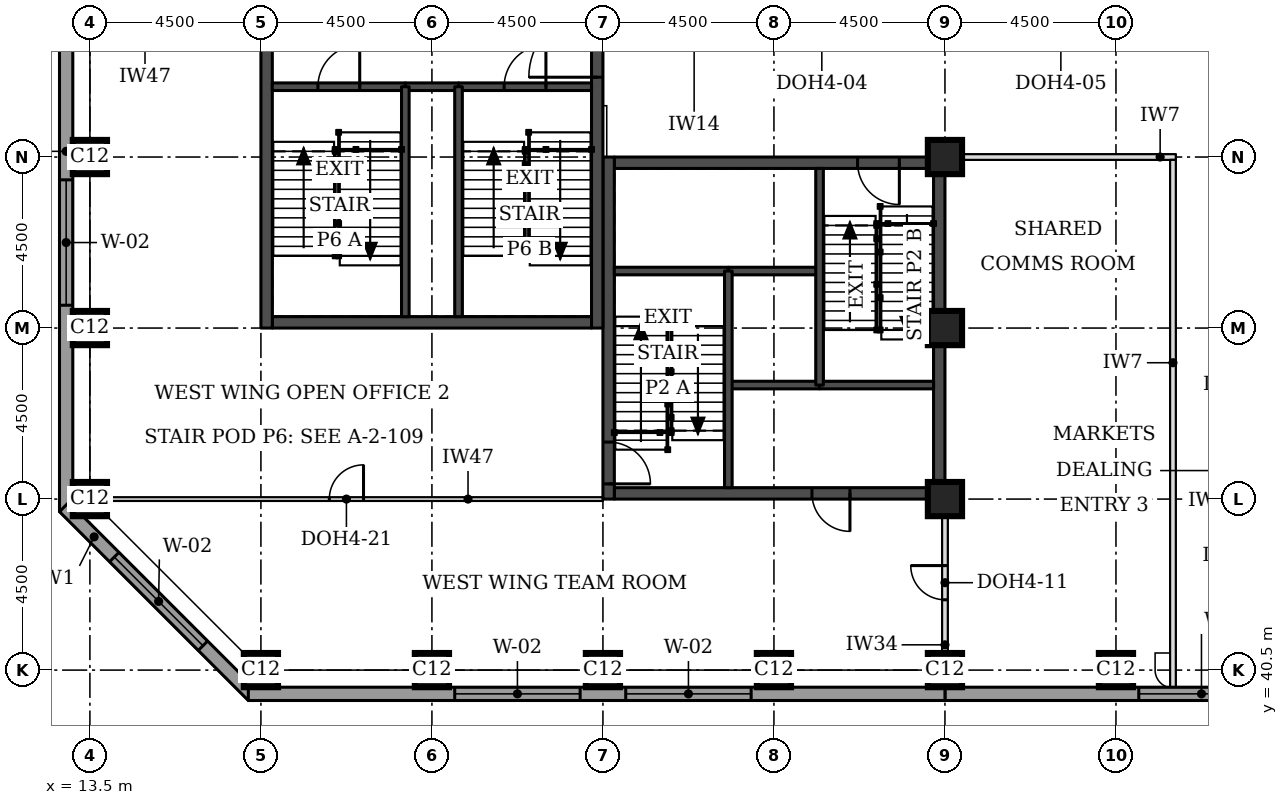
"""IFC4 building model, lengths in metres.
Left out: names, types, materials, properties, quantities, classifications, styles, units other than length and angle.
Written with IfcOpenShell. Run it as: python <this file> out.ifc"""

import sys

from ifc_helpers import new_model, si_unit, direction, frame, frame_2d, origin, origin_2d, place, context, subcontext, project, spatial, rectangle, extrude, element, fill, save


model = new_model("IFC4")
c1 = context("Model", 3, precision=1e-05, world=origin(), true_north=direction((0.0, 1.0)))
c2 = subcontext(c1, "Body", "Model", "MODEL_VIEW")
j1 = project(units=[si_unit("LENGTHUNIT", "METRE"), si_unit("PLANEANGLEUNIT", "RADIAN")], contexts=[c1])
p1 = place(None, origin())
s1 = spatial("IfcSite", under=j1, at=p1, CompositionType="ELEMENT")
p2 = place(p1, origin())
s2 = spatial("IfcBuilding", under=s1, at=p2, CompositionType="ELEMENT")
p3 = place(p2, frame((0.0, 0.0, 173.6)))
s3 = spatial("IfcBuildingStorey", under=s2, at=p3, CompositionType="ELEMENT", Elevation=173.6)
for number, where, z_axis, x_axis in (
    (1, (18.0, 40.5, 0.0), (0.0, 0.0, 1.0), (1.0, 0.0, 0.0)),
    (2, (22.5, 40.5, 0.0), (0.0, 0.0, 1.0), (1.0, 0.0, 0.0)),
    (3, (27.0, 40.5, 0.0), (0.0, 0.0, 1.0), (1.0, 0.0, 0.0)),
    (4, (31.5, 40.5, 0.0), (0.0, 0.0, 1.0), (1.0, 0.0, 0.0)),
    (5, (36.0, 40.5, 0.0), (0.0, 0.0, 1.0), (1.0, 0.0, 0.0)),
    (6, (40.5, 40.5, 0.0), (0.0, 0.0, 1.0), (1.0, 0.0, 0.0)),
    (7, (13.5, 45.0, 0.0), (0.0, 0.0, 1.0), (1.0, 0.0, 0.0)),
    (8, (36.0, 45.0, 0.0), (0.0, 0.0, 1.0), (1.0, 0.0, 0.0)),
    (9, (13.5, 49.5, 0.0), (0.0, 0.0, 1.0), (1.0, 0.0, 0.0)),
    (10, (36.0, 49.5, 0.0), (0.0, 0.0, 1.0), (1.0, 0.0, 0.0)),
    (11, (13.5, 54.0, 0.0), (0.0, 0.0, 1.0), (1.0, 0.0, 0.0)),
    (12, (36.0, 54.0, 0.0), (0.0, 0.0, 1.0), (1.0, 0.0, 0.0)),
):
    element("IfcColumn", number, at=place(p3, frame(where, z_axis=z_axis, x_axis=x_axis)), inside=s3, PredefinedType="COLUMN", context=c2, shape_type="SweptSolid", body=[
        extrude(rectangle(XDim=0.9, YDim=0.9, at=origin_2d()), origin(), (0.0, 0.0, 1.0), 3.7),
    ])
p4 = place(p3, frame((27.3, 45.15, 0.0), z_axis=(0.0, 0.0, 1.0), x_axis=(1.0, 0.0, 0.0)))
e13 = element("IfcWall", 13, at=p4, inside=s3, PredefinedType="SHEAR", context=c2, shape_type="SweptSolid", body=[
    extrude(rectangle(XDim=8.4, YDim=0.3, at=frame_2d((4.2, 0.0))), origin(), (0.0, 0.0, 1.0), 3.7),
])
p5 = place(p4, frame((5.2, 0.0, 0.0)))
e14 = element("IfcOpeningElement", 14, at=p5, cuts=e13, PredefinedType="OPENING", context=c2, shape_type="SweptSolid", body=[
    extrude(rectangle(XDim=1.0, YDim=2.1, at=frame_2d((0.5, 1.05))), frame((0.0, 0.16, 0.0), z_axis=(0.0, -1.0, 0.0), x_axis=(1.0, 0.0, 0.0)), (0.0, 0.0, 1.0), 0.32),
])
p6 = place(p3, frame((27.3, 53.85, 0.0), z_axis=(0.0, 0.0, 1.0), x_axis=(1.0, 0.0, 0.0)))
e15 = element("IfcWall", 15, at=p6, inside=s3, PredefinedType="SHEAR", context=c2, shape_type="SweptSolid", body=[
    extrude(rectangle(XDim=8.4, YDim=0.3, at=frame_2d((4.2, 0.0))), origin(), (0.0, 0.0, 1.0), 3.7),
])
p7 = place(p6, frame((6.4, 0.0, 0.0)))
e16 = element("IfcOpeningElement", 16, at=p7, cuts=e15, PredefinedType="OPENING", context=c2, shape_type="SweptSolid", body=[
    extrude(rectangle(XDim=1.1, YDim=2.1, at=frame_2d((0.55, 1.05))), frame((0.0, 0.16, 0.0), z_axis=(0.0, -1.0, 0.0), x_axis=(1.0, 0.0, 0.0)), (0.0, 0.0, 1.0), 0.32),
])
p8 = place(p3, frame((27.15, 45.0, 0.0), z_axis=(0.0, 0.0, 1.0), x_axis=(0.0, 1.0, 0.0)))
e17 = element("IfcWall", 17, at=p8, inside=s3, PredefinedType="SHEAR", context=c2, shape_type="SweptSolid", body=[
    extrude(rectangle(XDim=9.0, YDim=0.3, at=frame_2d((4.5, 0.0))), origin(), (0.0, 0.0, 1.0), 3.7),
])
p9 = place(p8, frame((0.4, 0.0, 0.0)))
e18 = element("IfcOpeningElement", 18, at=p9, cuts=e17, PredefinedType="OPENING", context=c2, shape_type="SweptSolid", body=[
    extrude(rectangle(XDim=1.1, YDim=2.1, at=frame_2d((0.55, 1.05))), frame((0.0, 0.16, 0.0), z_axis=(0.0, -1.0, 0.0), x_axis=(1.0, 0.0, 0.0)), (0.0, 0.0, 1.0), 0.32),
])
p10 = place(p3, frame((35.85, 45.0, 0.0), z_axis=(0.0, 0.0, 1.0), x_axis=(0.0, 1.0, 0.0)))
e19 = element("IfcWall", 19, at=p10, inside=s3, PredefinedType="SHEAR", context=c2, shape_type="SweptSolid", body=[
    extrude(rectangle(XDim=9.0, YDim=0.3, at=frame_2d((4.5, 0.0))), origin(), (0.0, 0.0, 1.0), 3.7),
])
p11 = place(p3, frame((18.3, 49.65, 0.0), z_axis=(0.0, 0.0, 1.0), x_axis=(1.0, 0.0, 0.0)))
e20 = element("IfcWall", 20, at=p11, inside=s3, PredefinedType="SHEAR", context=c2, shape_type="SweptSolid", body=[
    extrude(rectangle(XDim=8.4, YDim=0.3, at=frame_2d((4.2, 0.0))), origin(), (0.0, 0.0, 1.0), 3.7),
])
p12 = place(p3, frame((18.15, 49.5, 0.0), z_axis=(0.0, 0.0, 1.0), x_axis=(0.0, 1.0, 0.0)))
e21 = element("IfcWall", 21, at=p12, inside=s3, PredefinedType="SHEAR", context=c2, shape_type="SweptSolid", body=[
    extrude(rectangle(XDim=9.0, YDim=0.3, at=frame_2d((4.5, 0.0))), origin(), (0.0, 0.0, 1.0), 3.7),
])
p13 = place(p3, frame((26.85, 49.5, 0.0), z_axis=(0.0, 0.0, 1.0), x_axis=(0.0, 1.0, 0.0)))
e22 = element("IfcWall", 22, at=p13, inside=s3, PredefinedType="SHEAR", context=c2, shape_type="SweptSolid", body=[
    extrude(rectangle(XDim=9.0, YDim=0.3, at=frame_2d((4.5, 0.0))), origin(), (0.0, 0.0, 1.0), 3.7),
])
p14 = place(p13, frame((6.6, 0.0, 0.0)))
e23 = element("IfcOpeningElement", 23, at=p14, cuts=e22, PredefinedType="OPENING", context=c2, shape_type="SweptSolid", body=[
    extrude(rectangle(XDim=1.8, YDim=2.1, at=frame_2d((0.9, 1.05))), frame((0.0, 0.16, 0.0), z_axis=(0.0, -1.0, 0.0), x_axis=(1.0, 0.0, 0.0)), (0.0, 0.0, 1.0), 0.32),
])
p15 = place(p3, frame((36.0, 39.875, 0.0), z_axis=(0.0, 0.0, 1.0), x_axis=(1.0, 0.0, 0.0)))
e24 = element("IfcWall", 24, at=p15, inside=s3, PredefinedType="STANDARD", context=c2, shape_type="SweptSolid", body=[
    extrude(rectangle(XDim=36.331, YDim=0.35, at=frame_2d((18.166, 0.0))), origin(), (0.0, 0.0, 1.0), 3.525),
])
p16 = place(p15, frame((5.1, 0.0, 0.9)))
e25 = element("IfcOpeningElement", 25, at=p16, cuts=e24, PredefinedType="OPENING", context=c2, shape_type="SweptSolid", body=[
    extrude(rectangle(XDim=3.3, YDim=1.9, at=frame_2d((1.65, 0.95))), frame((0.0, 0.185, 0.0), z_axis=(0.0, -1.0, 0.0), x_axis=(1.0, 0.0, 0.0)), (0.0, 0.0, 1.0), 0.37),
])
p17 = place(p15, frame((9.6, 0.0, 0.9)))
e26 = element("IfcOpeningElement", 26, at=p17, cuts=e24, PredefinedType="OPENING", context=c2, shape_type="SweptSolid", body=[
    extrude(rectangle(XDim=3.3, YDim=1.9, at=frame_2d((1.65, 0.95))), frame((0.0, 0.185, 0.0), z_axis=(0.0, -1.0, 0.0), x_axis=(1.0, 0.0, 0.0)), (0.0, 0.0, 1.0), 0.37),
])
p18 = place(p15, frame((14.1, 0.0, 0.9)))
e27 = element("IfcOpeningElement", 27, at=p18, cuts=e24, PredefinedType="OPENING", context=c2, shape_type="SweptSolid", body=[
    extrude(rectangle(XDim=3.3, YDim=1.9, at=frame_2d((1.65, 0.95))), frame((0.0, 0.185, 0.0), z_axis=(0.0, -1.0, 0.0), x_axis=(1.0, 0.0, 0.0)), (0.0, 0.0, 1.0), 0.37),
])
p19 = place(p15, frame((18.6, 0.0, 0.9)))
e28 = element("IfcOpeningElement", 28, at=p19, cuts=e24, PredefinedType="OPENING", context=c2, shape_type="SweptSolid", body=[
    extrude(rectangle(XDim=3.3, YDim=1.9, at=frame_2d((1.65, 0.95))), frame((0.0, 0.185, 0.0), z_axis=(0.0, -1.0, 0.0), x_axis=(1.0, 0.0, 0.0)), (0.0, 0.0, 1.0), 0.37),
])
p20 = place(p15, frame((23.1, 0.0, 0.9)))
e29 = element("IfcOpeningElement", 29, at=p20, cuts=e24, PredefinedType="OPENING", context=c2, shape_type="SweptSolid", body=[
    extrude(rectangle(XDim=3.3, YDim=1.9, at=frame_2d((1.65, 0.95))), frame((0.0, 0.185, 0.0), z_axis=(0.0, -1.0, 0.0), x_axis=(1.0, 0.0, 0.0)), (0.0, 0.0, 1.0), 0.37),
])
p21 = place(p15, frame((27.6, 0.0, 0.9)))
e30 = element("IfcOpeningElement", 30, at=p21, cuts=e24, PredefinedType="OPENING", context=c2, shape_type="SweptSolid", body=[
    extrude(rectangle(XDim=3.3, YDim=1.9, at=frame_2d((1.65, 0.95))), frame((0.0, 0.185, 0.0), z_axis=(0.0, -1.0, 0.0), x_axis=(1.0, 0.0, 0.0)), (0.0, 0.0, 1.0), 0.37),
])
p22 = place(p3, frame((12.875, 58.831, 0.0), z_axis=(0.0, 0.0, 1.0), x_axis=(0.0, -1.0, 0.0)))
e31 = element("IfcWall", 31, at=p22, inside=s3, PredefinedType="STANDARD", context=c2, shape_type="SweptSolid", body=[
    extrude(rectangle(XDim=14.163, YDim=0.35, at=frame_2d((7.081, 0.0))), origin(), (0.0, 0.0, 1.0), 3.525),
])
p23 = place(p22, frame((5.431, 0.0, 0.9)))
e32 = element("IfcOpeningElement", 32, at=p23, cuts=e31, PredefinedType="OPENING", context=c2, shape_type="SweptSolid", body=[
    extrude(rectangle(XDim=3.3, YDim=1.9, at=frame_2d((1.65, 0.95))), frame((0.0, 0.185, 0.0), z_axis=(0.0, -1.0, 0.0), x_axis=(1.0, 0.0, 0.0)), (0.0, 0.0, 1.0), 0.37),
])
p24 = place(p3, frame((12.824, 44.792, 0.0), z_axis=(0.0, 0.0, 1.0), x_axis=(0.707106781187, -0.707106781187, 0.0)))
e33 = element("IfcWall", 33, at=p24, inside=s3, PredefinedType="STANDARD", context=c2, shape_type="SweptSolid", body=[
    extrude(rectangle(XDim=7.027, YDim=0.35, at=frame_2d((3.513, 0.0))), origin(), (0.0, 0.0, 1.0), 3.525),
])
p25 = place(p24, frame((1.863, 0.0, 0.9)))
e34 = element("IfcOpeningElement", 34, at=p25, cuts=e33, PredefinedType="OPENING", context=c2, shape_type="SweptSolid", body=[
    extrude(rectangle(XDim=3.3, YDim=1.9, at=frame_2d((1.65, 0.95))), frame((0.0, 0.185, 0.0), z_axis=(0.0, -1.0, 0.0), x_axis=(1.0, 0.0, 0.0)), (0.0, 0.0, 1.0), 0.37),
])
p26 = place(p3, frame((17.669, 39.875, 0.0), z_axis=(0.0, 0.0, 1.0), x_axis=(1.0, 0.0, 0.0)))
e35 = element("IfcWall", 35, at=p26, inside=s3, PredefinedType="STANDARD", context=c2, shape_type="SweptSolid", body=[
    extrude(rectangle(XDim=18.331, YDim=0.35, at=frame_2d((9.166, 0.0))), origin(), (0.0, 0.0, 1.0), 3.525),
])
p27 = place(p26, frame((5.431, 0.0, 0.9)))
e36 = element("IfcOpeningElement", 36, at=p27, cuts=e35, PredefinedType="OPENING", context=c2, shape_type="SweptSolid", body=[
    extrude(rectangle(XDim=3.3, YDim=1.9, at=frame_2d((1.65, 0.95))), frame((0.0, 0.185, 0.0), z_axis=(0.0, -1.0, 0.0), x_axis=(1.0, 0.0, 0.0)), (0.0, 0.0, 1.0), 0.37),
])
p28 = place(p26, frame((9.931, 0.0, 0.9)))
e37 = element("IfcOpeningElement", 37, at=p28, cuts=e35, PredefinedType="OPENING", context=c2, shape_type="SweptSolid", body=[
    extrude(rectangle(XDim=3.3, YDim=1.9, at=frame_2d((1.65, 0.95))), frame((0.0, 0.185, 0.0), z_axis=(0.0, -1.0, 0.0), x_axis=(1.0, 0.0, 0.0)), (0.0, 0.0, 1.0), 0.37),
])
p29 = place(p3, frame((36.45, 54.0, 0.0), z_axis=(0.0, 0.0, 1.0), x_axis=(1.0, 0.0, 0.0)))
e38 = element("IfcWall", 38, at=p29, inside=s3, PredefinedType="PARTITIONING", context=c2, shape_type="SweptSolid", body=[
    extrude(rectangle(XDim=5.625, YDim=0.15, at=frame_2d((2.812, 0.0))), origin(), (0.0, 0.0, 1.0), 3.55),
])
p30 = place(p3, frame((42.0, 40.05, 0.0), z_axis=(0.0, 0.0, 1.0), x_axis=(0.0, 1.0, 0.0)))
e39 = element("IfcWall", 39, at=p30, inside=s3, PredefinedType="PARTITIONING", context=c2, shape_type="SweptSolid", body=[
    extrude(rectangle(XDim=13.875, YDim=0.15, at=frame_2d((6.938, 0.0))), origin(), (0.0, 0.0, 1.0), 3.55),
])
p31 = place(p3, frame((36.0, 40.95, 0.0), z_axis=(0.0, 0.0, 1.0), x_axis=(0.0, 1.0, 0.0)))
e40 = element("IfcWall", 40, at=p31, inside=s3, PredefinedType="PARTITIONING", context=c2, shape_type="SweptSolid", body=[
    extrude(rectangle(XDim=3.63, YDim=0.15, at=frame_2d((1.815, 0.0))), origin(), (0.0, 0.0, 1.0), 2.8),
])
p32 = place(p31, frame((1.4, 0.0, 0.0)))
e41 = element("IfcOpeningElement", 41, at=p32, cuts=e40, PredefinedType="OPENING", context=c2, shape_type="SweptSolid", body=[
    extrude(rectangle(XDim=0.9, YDim=2.1, at=frame_2d((0.45, 1.05))), frame((0.0, 0.085, 0.0), z_axis=(0.0, -1.0, 0.0), x_axis=(1.0, 0.0, 0.0)), (0.0, 0.0, 1.0), 0.17),
])
p33 = place(p3, frame((27.0, 45.0, 0.0), z_axis=(0.0, 0.0, 1.0), x_axis=(-1.0, 0.0, 0.0)))
e42 = element("IfcWall", 42, at=p33, inside=s3, PredefinedType="PARTITIONING", context=c2, shape_type="SweptSolid", body=[
    extrude(rectangle(XDim=13.5, YDim=0.1, at=frame_2d((6.75, 0.0))), origin(), (0.0, 0.0, 1.0), 2.55),
])
p34 = place(p33, frame((6.3, 0.0, 0.0)))
e43 = element("IfcOpeningElement", 43, at=p34, cuts=e42, PredefinedType="OPENING", context=c2, shape_type="SweptSolid", body=[
    extrude(rectangle(XDim=0.9, YDim=2.1, at=frame_2d((0.45, 1.05))), frame((0.0, 0.06, 0.0), z_axis=(0.0, -1.0, 0.0), x_axis=(1.0, 0.0, 0.0)), (0.0, 0.0, 1.0), 0.12),
])
p35 = place(p3, frame((30.3, 48.0, 0.0), z_axis=(0.0, 0.0, 1.0), x_axis=(1.0, 0.0, 0.0)))
e44 = element("IfcWall", 44, at=p35, inside=s3, PredefinedType="SOLIDWALL", context=c2, shape_type="SweptSolid", body=[
    extrude(rectangle(XDim=2.4, YDim=0.2, at=frame_2d((1.2, 0.0))), origin(), (0.0, 0.0, 1.0), 3.55),
])
p36 = place(p3, frame((32.7, 48.0, 0.0), z_axis=(0.0, 0.0, 1.0), x_axis=(1.0, 0.0, 0.0)))
e45 = element("IfcWall", 45, at=p36, inside=s3, PredefinedType="SOLIDWALL", context=c2, shape_type="SweptSolid", body=[
    extrude(rectangle(XDim=3.0, YDim=0.2, at=frame_2d((1.5, 0.0))), origin(), (0.0, 0.0, 1.0), 3.55),
])
p37 = place(p3, frame((30.3, 51.0, 0.0), z_axis=(0.0, 0.0, 1.0), x_axis=(1.0, 0.0, 0.0)))
e46 = element("IfcWall", 46, at=p37, inside=s3, PredefinedType="SOLIDWALL", context=c2, shape_type="SweptSolid", body=[
    extrude(rectangle(XDim=2.4, YDim=0.2, at=frame_2d((1.2, 0.0))), origin(), (0.0, 0.0, 1.0), 3.7),
])
p38 = place(p3, frame((27.3, 51.0, 0.0), z_axis=(0.0, 0.0, 1.0), x_axis=(1.0, 0.0, 0.0)))
e47 = element("IfcWall", 47, at=p38, inside=s3, PredefinedType="SOLIDWALL", context=c2, shape_type="SweptSolid", body=[
    extrude(rectangle(XDim=3.0, YDim=0.2, at=frame_2d((1.5, 0.0))), origin(), (0.0, 0.0, 1.0), 3.55),
])
for number, where, z_axis, x_axis in (
    (48, (30.3, 45.3, 0.0), (0.0, 0.0, 1.0), (0.0, 1.0, 0.0)),
    (49, (32.7, 48.0, 0.0), (0.0, 0.0, 1.0), (0.0, 1.0, 0.0)),
):
    element("IfcWall", number, at=place(p3, frame(where, z_axis=z_axis, x_axis=x_axis)), inside=s3, PredefinedType="SOLIDWALL", context=c2, shape_type="SweptSolid", body=[
        extrude(rectangle(XDim=5.7, YDim=0.2, at=frame_2d((2.85, 0.0))), origin(), (0.0, 0.0, 1.0), 3.55),
    ])
p39 = place(p3, frame((21.8, 55.85, 0.0), z_axis=(0.0, 0.0, 1.0), x_axis=(1.0, 0.0, 0.0)))
e50 = element("IfcWall", 50, at=p39, inside=s3, PredefinedType="SOLIDWALL", context=c2, shape_type="SweptSolid", body=[
    extrude(rectangle(XDim=1.4, YDim=0.2, at=frame_2d((0.7, 0.0))), origin(), (0.0, 0.0, 1.0), 3.55),
])
p40 = place(p3, frame((18.3, 55.85, 0.0), z_axis=(0.0, 0.0, 1.0), x_axis=(1.0, 0.0, 0.0)))
e51 = element("IfcWall", 51, at=p40, inside=s3, PredefinedType="SOLIDWALL", context=c2, shape_type="SweptSolid", body=[
    extrude(rectangle(XDim=3.5, YDim=0.2, at=frame_2d((1.75, 0.0))), origin(), (0.0, 0.0, 1.0), 3.55),
])
p41 = place(p40, frame((1.2, 0.0, 0.0)))
e52 = element("IfcOpeningElement", 52, at=p41, cuts=e51, PredefinedType="OPENING", context=c2, shape_type="SweptSolid", body=[
    extrude(rectangle(XDim=1.1, YDim=2.1, at=frame_2d((0.55, 1.05))), frame((0.0, 0.11, 0.0), z_axis=(0.0, -1.0, 0.0), x_axis=(1.0, 0.0, 0.0)), (0.0, 0.0, 1.0), 0.22),
])
p42 = place(p3, frame((23.2, 55.85, 0.0), z_axis=(0.0, 0.0, 1.0), x_axis=(1.0, 0.0, 0.0)))
e53 = element("IfcWall", 53, at=p42, inside=s3, PredefinedType="SOLIDWALL", context=c2, shape_type="SweptSolid", body=[
    extrude(rectangle(XDim=3.5, YDim=0.2, at=frame_2d((1.75, 0.0))), origin(), (0.0, 0.0, 1.0), 3.55),
])
p43 = place(p42, frame((1.2, 0.0, 0.0)))
e54 = element("IfcOpeningElement", 54, at=p43, cuts=e53, PredefinedType="OPENING", context=c2, shape_type="SweptSolid", body=[
    extrude(rectangle(XDim=1.1, YDim=2.1, at=frame_2d((0.55, 1.05))), frame((0.0, 0.11, 0.0), z_axis=(0.0, -1.0, 0.0), x_axis=(1.0, 0.0, 0.0)), (0.0, 0.0, 1.0), 0.22),
])
for number, where, z_axis, x_axis in (
    (55, (21.8, 49.8, 0.0), (0.0, 0.0, 1.0), (0.0, 1.0, 0.0)),
    (56, (23.2, 49.8, 0.0), (0.0, 0.0, 1.0), (0.0, 1.0, 0.0)),
):
    element("IfcWall", number, at=place(p3, frame(where, z_axis=z_axis, x_axis=x_axis)), inside=s3, PredefinedType="SOLIDWALL", context=c2, shape_type="SweptSolid", body=[
        extrude(rectangle(XDim=6.05, YDim=0.2, at=frame_2d((3.025, 0.0))), origin(), (0.0, 0.0, 1.0), 3.55),
    ])
p44 = place(p16, origin())
e57 = element("IfcWindow", 57, at=p44, inside=s3, PartitioningType="SINGLE_PANEL", PredefinedType="WINDOW", context=c2, shape_type="SweptSolid", body=[
    extrude(rectangle(XDim=3.3, YDim=1.9, at=frame_2d((1.65, 0.95))), frame((0.0, 0.085, 0.0), z_axis=(0.0, -1.0, 0.0), x_axis=(1.0, 0.0, 0.0)), (0.0, 0.0, 1.0), 0.06),
])
fill(e25, e57)
p45 = place(p23, origin())
e58 = element("IfcWindow", 58, at=p45, inside=s3, PartitioningType="SINGLE_PANEL", PredefinedType="WINDOW", context=c2, shape_type="SweptSolid", body=[
    extrude(rectangle(XDim=3.3, YDim=1.9, at=frame_2d((1.65, 0.95))), frame((0.0, 0.085, 0.0), z_axis=(0.0, -1.0, 0.0), x_axis=(1.0, 0.0, 0.0)), (0.0, 0.0, 1.0), 0.06),
])
fill(e32, e58)
p46 = place(p25, origin())
e59 = element("IfcWindow", 59, at=p46, inside=s3, PartitioningType="SINGLE_PANEL", PredefinedType="WINDOW", context=c2, shape_type="SweptSolid", body=[
    extrude(rectangle(XDim=3.3, YDim=1.9, at=frame_2d((1.65, 0.95))), frame((0.0, 0.085, 0.0), z_axis=(0.0, -1.0, 0.0), x_axis=(1.0, 0.0, 0.0)), (0.0, 0.0, 1.0), 0.06),
])
fill(e34, e59)
p47 = place(p27, origin())
e60 = element("IfcWindow", 60, at=p47, inside=s3, PartitioningType="SINGLE_PANEL", PredefinedType="WINDOW", context=c2, shape_type="SweptSolid", body=[
    extrude(rectangle(XDim=3.3, YDim=1.9, at=frame_2d((1.65, 0.95))), frame((0.0, 0.085, 0.0), z_axis=(0.0, -1.0, 0.0), x_axis=(1.0, 0.0, 0.0)), (0.0, 0.0, 1.0), 0.06),
])
fill(e36, e60)
p48 = place(p28, origin())
e61 = element("IfcWindow", 61, at=p48, inside=s3, PartitioningType="SINGLE_PANEL", PredefinedType="WINDOW", context=c2, shape_type="SweptSolid", body=[
    extrude(rectangle(XDim=3.3, YDim=1.9, at=frame_2d((1.65, 0.95))), frame((0.0, 0.085, 0.0), z_axis=(0.0, -1.0, 0.0), x_axis=(1.0, 0.0, 0.0)), (0.0, 0.0, 1.0), 0.06),
])
fill(e37, e61)
p49 = place(p32, origin())
e62 = element("IfcDoor", 62, at=p49, inside=s3, OperationType="SINGLE_SWING_RIGHT", PredefinedType="DOOR", context=c2, shape_type="SweptSolid", body=[
    extrude(rectangle(XDim=0.9, YDim=2.1, at=frame_2d((0.45, 1.05))), frame((0.0, 0.025, 0.0), z_axis=(0.0, -1.0, 0.0), x_axis=(1.0, 0.0, 0.0)), (0.0, 0.0, 1.0), 0.05),
])
fill(e41, e62)
p50 = place(p34, frame((0.9, 0.0, 0.0), z_axis=(0.0, 0.0, 1.0), x_axis=(-1.0, 0.0, 0.0)))
e63 = element("IfcDoor", 63, at=p50, inside=s3, OperationType="SINGLE_SWING_RIGHT", PredefinedType="DOOR", context=c2, shape_type="SweptSolid", body=[
    extrude(rectangle(XDim=0.9, YDim=2.1, at=frame_2d((0.45, 1.05))), frame((0.0, 0.025, 0.0), z_axis=(0.0, -1.0, 0.0), x_axis=(1.0, 0.0, 0.0)), (0.0, 0.0, 1.0), 0.05),
])
fill(e43, e63)
p51 = place(p9, frame((1.1, 0.0, 0.0), z_axis=(0.0, 0.0, 1.0), x_axis=(-1.0, 0.0, 0.0)))
e64 = element("IfcDoor", 64, at=p51, inside=s3, OperationType="SINGLE_SWING_RIGHT", PredefinedType="DOOR", context=c2, shape_type="SweptSolid", body=[
    extrude(rectangle(XDim=1.1, YDim=2.1, at=frame_2d((0.55, 1.05))), frame((0.0, 0.025, 0.0), z_axis=(0.0, -1.0, 0.0), x_axis=(1.0, 0.0, 0.0)), (0.0, 0.0, 1.0), 0.05),
])
fill(e18, e64)
p52 = place(p7, frame((1.1, 0.0, 0.0), z_axis=(0.0, 0.0, 1.0), x_axis=(-1.0, 0.0, 0.0)))
e65 = element("IfcDoor", 65, at=p52, inside=s3, OperationType="SINGLE_SWING_LEFT", PredefinedType="DOOR", context=c2, shape_type="SweptSolid", body=[
    extrude(rectangle(XDim=1.1, YDim=2.1, at=frame_2d((0.55, 1.05))), frame((0.0, 0.025, 0.0), z_axis=(0.0, -1.0, 0.0), x_axis=(1.0, 0.0, 0.0)), (0.0, 0.0, 1.0), 0.05),
])
fill(e16, e65)
p53 = place(p5, frame((1.0, 0.0, 0.0), z_axis=(0.0, 0.0, 1.0), x_axis=(-1.0, 0.0, 0.0)))
e66 = element("IfcDoor", 66, at=p53, inside=s3, OperationType="SINGLE_SWING_LEFT", PredefinedType="DOOR", context=c2, shape_type="SweptSolid", body=[
    extrude(rectangle(XDim=1.0, YDim=2.1, at=frame_2d((0.5, 1.05))), frame((0.0, 0.025, 0.0), z_axis=(0.0, -1.0, 0.0), x_axis=(1.0, 0.0, 0.0)), (0.0, 0.0, 1.0), 0.05),
])
fill(e14, e66)
p54 = place(p41, origin())
e67 = element("IfcDoor", 67, at=p54, inside=s3, OperationType="SINGLE_SWING_RIGHT", PredefinedType="DOOR", context=c2, shape_type="SweptSolid", body=[
    extrude(rectangle(XDim=1.1, YDim=2.1, at=frame_2d((0.55, 1.05))), frame((0.0, 0.025, 0.0), z_axis=(0.0, -1.0, 0.0), x_axis=(1.0, 0.0, 0.0)), (0.0, 0.0, 1.0), 0.05),
])
fill(e52, e67)
p55 = place(p43, origin())
e68 = element("IfcDoor", 68, at=p55, inside=s3, OperationType="SINGLE_SWING_RIGHT", PredefinedType="DOOR", context=c2, shape_type="SweptSolid", body=[
    extrude(rectangle(XDim=1.1, YDim=2.1, at=frame_2d((0.55, 1.05))), frame((0.0, 0.025, 0.0), z_axis=(0.0, -1.0, 0.0), x_axis=(1.0, 0.0, 0.0)), (0.0, 0.0, 1.0), 0.05),
])
fill(e54, e68)
p56 = place(p14, origin())
e69 = element("IfcDoor", 69, at=p56, inside=s3, OperationType="SINGLE_SWING_LEFT", PredefinedType="DOOR", context=c2, shape_type="SweptSolid", body=[
    extrude(rectangle(XDim=1.8, YDim=2.1, at=frame_2d((0.9, 1.05))), frame((0.0, 0.025, 0.0), z_axis=(0.0, -1.0, 0.0), x_axis=(1.0, 0.0, 0.0)), (0.0, 0.0, 1.0), 0.05),
])
fill(e23, e69)
save(model, sys.argv[1])
